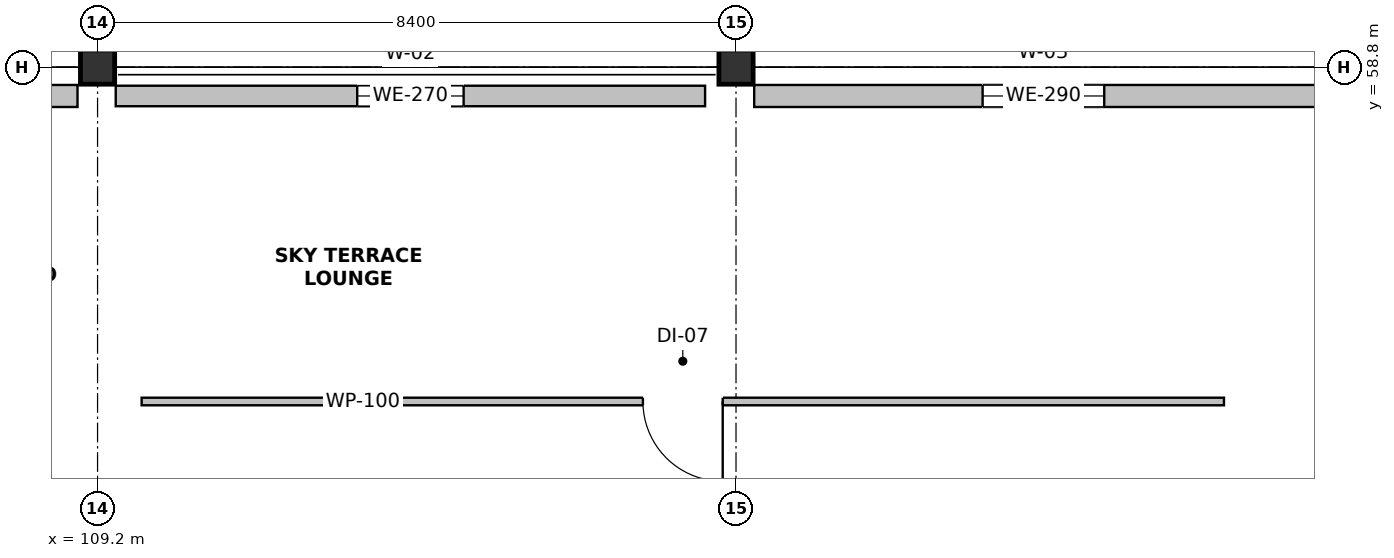
"""IFC4 building model, lengths in metres.
Left out: names, types, materials, properties, quantities, classifications, styles, units other than length and angle.
Written with IfcOpenShell. Run it as: python <this file> out.ifc"""

import sys

from ifc_helpers import new_model, si_unit, direction, frame, frame_2d, origin, origin_2d, place, context, subcontext, project, spatial, rectangle, extrude, element, fill, save


model = new_model("IFC4")
c1 = context("Model", 3, precision=1e-05, world=origin(), true_north=direction((0.0, 1.0)))
c2 = subcontext(c1, "Body", "Model", "MODEL_VIEW")
j1 = project(units=[si_unit("LENGTHUNIT", "METRE"), si_unit("PLANEANGLEUNIT", "RADIAN")], contexts=[c1])
p1 = place(None, origin())
s1 = spatial("IfcSite", under=j1, at=p1, CompositionType="ELEMENT")
p2 = place(p1, origin())
s2 = spatial("IfcBuilding", under=s1, at=p2, CompositionType="ELEMENT")
p3 = place(p2, frame((0.0, 0.0, 21.6)))
s3 = spatial("IfcBuildingStorey", under=s2, at=p3, CompositionType="ELEMENT", Elevation=21.6)
for number, where, z_axis, x_axis in (
    (1, (109.2, 58.8, 0.0), (0.0, 0.0, 1.0), (1.0, 0.0, 0.0)),
    (2, (117.6, 58.8, 0.0), (0.0, 0.0, 1.0), (1.0, 0.0, 0.0)),
):
    element("IfcColumn", number, at=place(p3, frame(where, z_axis=z_axis, x_axis=x_axis)), inside=s3, PredefinedType="COLUMN", context=c2, shape_type="SweptSolid", body=[
        extrude(rectangle(XDim=0.45, YDim=0.45, at=origin_2d()), origin(), (0.0, 0.0, 1.0), 3.9),
    ])
p4 = place(p3, frame((101.039, 58.42, 0.0), z_axis=(0.0, 0.0, 1.0), x_axis=(1.0, 0.0, 0.0)))
e3 = element("IfcWall", 3, at=p4, inside=s3, PredefinedType="SOLIDWALL", context=c2, shape_type="SweptSolid", body=[
    extrude(rectangle(XDim=7.897, YDim=0.29, at=frame_2d((3.949, 0.0))), origin(), (0.0, 0.0, 1.0), 3.24),
])
p5 = place(p4, frame((3.348, 0.0, 0.85)))
e4 = element("IfcOpeningElement", 4, at=p5, cuts=e3, PredefinedType="OPENING", context=c2, shape_type="SweptSolid", body=[
    extrude(rectangle(XDim=1.2, YDim=1.4, at=frame_2d((0.6, 0.7))), frame((0.0, 0.157, 0.0), z_axis=(0.0, -1.0, 0.0), x_axis=(1.0, 0.0, 0.0)), (0.0, 0.0, 1.0), 0.314),
])
p6 = place(p3, frame((109.439, 58.42, 0.0), z_axis=(0.0, 0.0, 1.0), x_axis=(1.0, 0.0, 0.0)))
e5 = element("IfcWall", 5, at=p6, inside=s3, PredefinedType="SOLIDWALL", context=c2, shape_type="SweptSolid", body=[
    extrude(rectangle(XDim=7.754, YDim=0.27, at=frame_2d((3.877, 0.0))), origin(), (0.0, 0.0, 1.0), 3.24),
])
p7 = place(p6, frame((3.177, 0.0, 0.85)))
e6 = element("IfcOpeningElement", 6, at=p7, cuts=e5, PredefinedType="OPENING", context=c2, shape_type="SweptSolid", body=[
    extrude(rectangle(XDim=1.4, YDim=1.4, at=frame_2d((0.7, 0.7))), frame((0.0, 0.147, 0.0), z_axis=(0.0, -1.0, 0.0), x_axis=(1.0, 0.0, 0.0)), (0.0, 0.0, 1.0), 0.294),
])
p8 = place(p3, frame((117.839, 58.42, 0.0), z_axis=(0.0, 0.0, 1.0), x_axis=(1.0, 0.0, 0.0)))
e7 = element("IfcWall", 7, at=p8, inside=s3, PredefinedType="SOLIDWALL", context=c2, shape_type="SweptSolid", body=[
    extrude(rectangle(XDim=7.611, YDim=0.29, at=frame_2d((3.805, 0.0))), origin(), (0.0, 0.0, 1.0), 3.24),
])
p9 = place(p8, frame((3.006, 0.0, 0.85)))
e8 = element("IfcOpeningElement", 8, at=p9, cuts=e7, PredefinedType="OPENING", context=c2, shape_type="SweptSolid", body=[
    extrude(rectangle(XDim=1.6, YDim=1.4, at=frame_2d((0.8, 0.7))), frame((0.0, 0.157, 0.0), z_axis=(0.0, -1.0, 0.0), x_axis=(1.0, 0.0, 0.0)), (0.0, 0.0, 1.0), 0.314),
])
p10 = place(p3, frame((124.02, 54.4, 0.0), z_axis=(0.0, 0.0, 1.0), x_axis=(-1.0, 0.0, 0.0)))
e9 = element("IfcWall", 9, at=p10, inside=s3, PredefinedType="PARTITIONING", context=c2, shape_type="SweptSolid", body=[
    extrude(rectangle(XDim=14.24, YDim=0.1, at=frame_2d((7.12, 0.0))), origin(), (0.0, 0.0, 1.0), 3.64),
])
p11 = place(p10, frame((6.595, 0.0, 0.0)))
e10 = element("IfcOpeningElement", 10, at=p11, cuts=e9, PredefinedType="OPENING", context=c2, shape_type="SweptSolid", body=[
    extrude(rectangle(XDim=1.05, YDim=2.15, at=frame_2d((0.525, 1.075))), frame((0.0, 0.062, 0.0), z_axis=(0.0, -1.0, 0.0), x_axis=(1.0, 0.0, 0.0)), (0.0, 0.0, 1.0), 0.124),
])
p12 = place(p7, origin())
e11 = element("IfcWindow", 11, at=p12, inside=s3, PartitioningType="SINGLE_PANEL", PredefinedType="WINDOW", context=c2, shape_type="SweptSolid", body=[
    extrude(rectangle(XDim=1.4, YDim=1.4, at=frame_2d((0.7, 0.7))), frame((0.0, 0.03, 0.0), z_axis=(0.0, -1.0, 0.0), x_axis=(1.0, 0.0, 0.0)), (0.0, 0.0, 1.0), 0.06),
])
fill(e6, e11)
p13 = place(p9, origin())
e12 = element("IfcWindow", 12, at=p13, inside=s3, PartitioningType="SINGLE_PANEL", PredefinedType="WINDOW", context=c2, shape_type="SweptSolid", body=[
    extrude(rectangle(XDim=1.6, YDim=1.4, at=frame_2d((0.8, 0.7))), frame((0.0, 0.03, 0.0), z_axis=(0.0, -1.0, 0.0), x_axis=(1.0, 0.0, 0.0)), (0.0, 0.0, 1.0), 0.06),
])
fill(e8, e12)
p14 = place(p11, origin())
e13 = element("IfcDoor", 13, at=p14, inside=s3, OperationType="SINGLE_SWING_LEFT", PredefinedType="DOOR", context=c2, shape_type="SweptSolid", body=[
    extrude(rectangle(XDim=1.05, YDim=2.15, at=frame_2d((0.525, 1.075))), frame((0.0, 0.025, 0.0), z_axis=(0.0, -1.0, 0.0), x_axis=(1.0, 0.0, 0.0)), (0.0, 0.0, 1.0), 0.05),
])
fill(e10, e13)
save(model, sys.argv[1])
